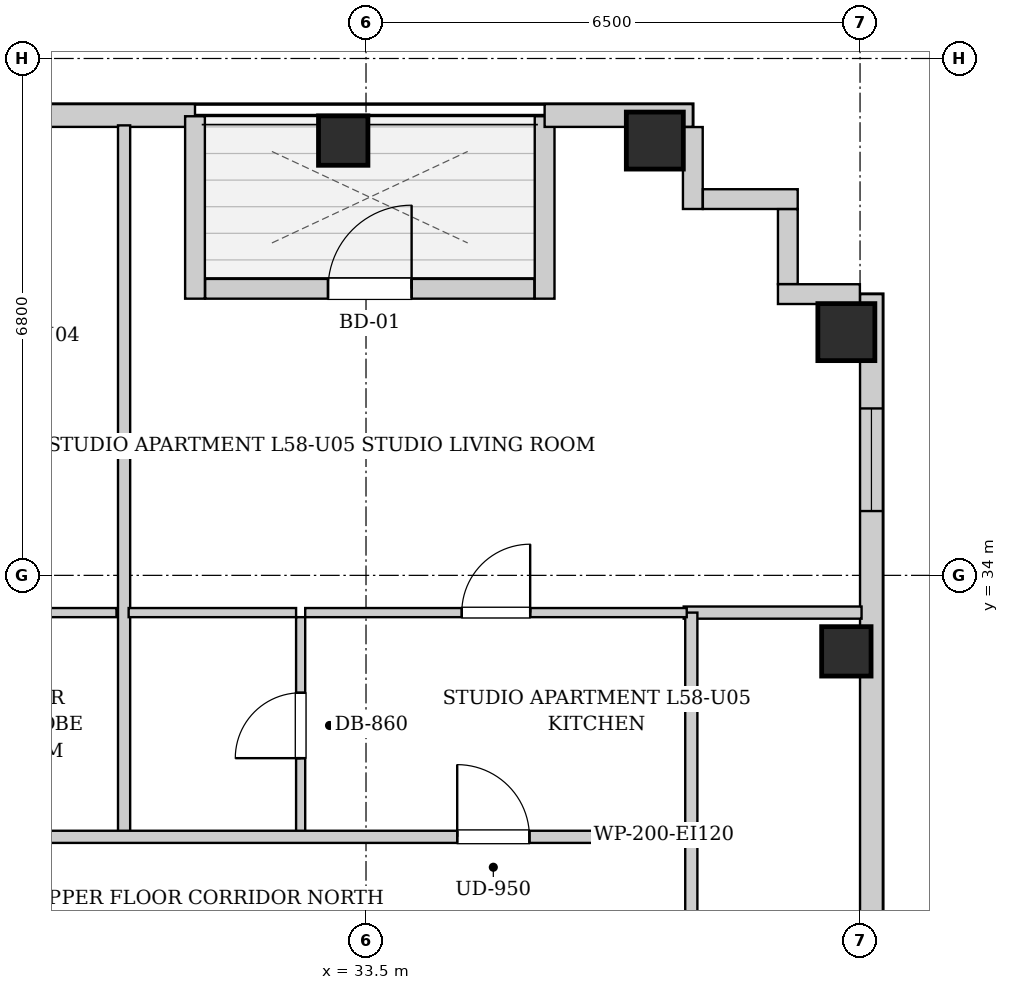
"""IFC4 building model, lengths in metres.
Left out: names, types, materials, properties, quantities, classifications, styles, units other than length and angle.
Written with IfcOpenShell. Run it as: python <this file> out.ifc"""

import sys

from ifc_helpers import new_model, si_unit, direction, frame, frame_2d, origin, origin_2d, place, context, subcontext, project, spatial, rectangle, extrude, element, fill, save


model = new_model("IFC4")
c1 = context("Model", 3, precision=1e-05, world=origin(), true_north=direction((0.0, 1.0)))
c2 = subcontext(c1, "Body", "Model", "MODEL_VIEW")
j1 = project(units=[si_unit("LENGTHUNIT", "METRE"), si_unit("PLANEANGLEUNIT", "RADIAN")], contexts=[c1])
p1 = place(None, origin())
s1 = spatial("IfcSite", under=j1, at=p1, CompositionType="ELEMENT")
p2 = place(p1, origin())
s2 = spatial("IfcBuilding", under=s1, at=p2, CompositionType="ELEMENT")
p3 = place(p2, frame((0.0, 0.0, 200.8)))
s3 = spatial("IfcBuildingStorey", under=s2, at=p3, CompositionType="ELEMENT", Elevation=200.8)
p4 = place(p3, frame((33.2, 39.72, 0.0), z_axis=(0.0, 0.0, 1.0), x_axis=(1.0, 0.0, 0.0)))
e1 = element("IfcColumn", 1, at=p4, inside=s3, PredefinedType="COLUMN", context=c2, shape_type="SweptSolid", body=[
    extrude(rectangle(XDim=0.65, YDim=0.65, at=origin_2d()), origin(), (0.0, 0.0, 1.0), 3.3),
])
p5 = place(p3, frame((37.3, 39.72, 0.0), z_axis=(0.0, 0.0, 1.0), x_axis=(1.0, 0.0, 0.0)))
e2 = element("IfcColumn", 2, at=p5, inside=s3, PredefinedType="COLUMN", context=c2, shape_type="SweptSolid", body=[
    extrude(rectangle(XDim=0.75, YDim=0.75, at=origin_2d()), origin(), (0.0, 0.0, 1.0), 3.3),
])
p6 = place(p3, frame((39.82, 33.0, 0.0), z_axis=(0.0, 0.0, 1.0), x_axis=(1.0, 0.0, 0.0)))
e3 = element("IfcColumn", 3, at=p6, inside=s3, PredefinedType="COLUMN", context=c2, shape_type="SweptSolid", body=[
    extrude(rectangle(XDim=0.65, YDim=0.65, at=origin_2d()), origin(), (0.0, 0.0, 1.0), 3.3),
])
p7 = place(p3, frame((39.82, 37.2, 0.0), z_axis=(0.0, 0.0, 1.0), x_axis=(1.0, 0.0, 0.0)))
e4 = element("IfcColumn", 4, at=p7, inside=s3, PredefinedType="COLUMN", context=c2, shape_type="SweptSolid", body=[
    extrude(rectangle(XDim=0.75, YDim=0.75, at=origin_2d()), origin(), (0.0, 0.0, 1.0), 3.3),
])
p8 = place(p3, frame((19.7, 40.05, 0.0), z_axis=(0.0, 0.0, 1.0), x_axis=(1.0, 0.0, 0.0)))
e5 = element("IfcWall", 5, at=p8, inside=s3, PredefinedType="SOLIDWALL", context=c2, shape_type="SweptSolid", body=[
    extrude(rectangle(XDim=11.55, YDim=0.3, at=frame_2d((5.775, 0.0))), origin(), (0.0, 0.0, 1.0), 3.04),
])
p9 = place(p8, frame((0.267, 0.0, 0.55)))
e6 = element("IfcOpeningElement", 6, at=p9, cuts=e5, PredefinedType="OPENING", context=c2, shape_type="SweptSolid", body=[
    extrude(rectangle(XDim=0.85, YDim=1.2, at=frame_2d((0.425, 0.6))), frame((0.0, 0.16, 0.0), z_axis=(0.0, -1.0, 0.0), x_axis=(1.0, 0.0, 0.0)), (0.0, 0.0, 1.0), 0.32),
])
p10 = place(p8, frame((1.95, 0.0, 0.55)))
e7 = element("IfcOpeningElement", 7, at=p10, cuts=e5, PredefinedType="OPENING", context=c2, shape_type="SweptSolid", body=[
    extrude(rectangle(XDim=0.85, YDim=1.2, at=frame_2d((0.425, 0.6))), frame((0.0, 0.16, 0.0), z_axis=(0.0, -1.0, 0.0), x_axis=(1.0, 0.0, 0.0)), (0.0, 0.0, 1.0), 0.32),
])
p11 = place(p8, frame((7.8, 0.0, 0.55)))
e8 = element("IfcOpeningElement", 8, at=p11, cuts=e5, PredefinedType="OPENING", context=c2, shape_type="SweptSolid", body=[
    extrude(rectangle(XDim=1.35, YDim=1.2, at=frame_2d((0.675, 0.6))), frame((0.0, 0.16, 0.0), z_axis=(0.0, -1.0, 0.0), x_axis=(1.0, 0.0, 0.0)), (0.0, 0.0, 1.0), 0.32),
])
p12 = place(p3, frame((31.25, 40.04, 0.0), z_axis=(0.0, 0.0, 1.0), x_axis=(0.0, -1.0, 0.0)))
e9 = element("IfcWall", 9, at=p12, inside=s3, PredefinedType="SOLIDWALL", context=c2, shape_type="SweptSolid", body=[
    extrude(rectangle(XDim=2.4, YDim=0.26, at=frame_2d((1.2, 0.0))), origin(), (0.0, 0.0, 1.0), 3.04),
])
p13 = place(p3, frame((31.384, 37.77, 0.0), z_axis=(0.0, 0.0, 1.0), x_axis=(1.0, 0.0, 0.0)))
e10 = element("IfcWall", 10, at=p13, inside=s3, PredefinedType="SOLIDWALL", context=c2, shape_type="SweptSolid", body=[
    extrude(rectangle(XDim=4.332, YDim=0.26, at=frame_2d((2.166, 0.0))), origin(), (0.0, 0.0, 1.0), 3.04),
])
p14 = place(p13, frame((1.616, 0.0, 0.0)))
e11 = element("IfcOpeningElement", 11, at=p14, cuts=e10, PredefinedType="OPENING", context=c2, shape_type="SweptSolid", body=[
    extrude(rectangle(XDim=1.1, YDim=2.0, at=frame_2d((0.55, 1.0))), frame((0.0, 0.14, 0.0), z_axis=(0.0, -1.0, 0.0), x_axis=(1.0, 0.0, 0.0)), (0.0, 0.0, 1.0), 0.28),
])
p15 = place(p3, frame((35.85, 37.64, 0.0), z_axis=(0.0, 0.0, 1.0), x_axis=(0.0, 1.0, 0.0)))
e12 = element("IfcWall", 12, at=p15, inside=s3, PredefinedType="SOLIDWALL", context=c2, shape_type="SweptSolid", body=[
    extrude(rectangle(XDim=2.4, YDim=0.26, at=frame_2d((1.2, 0.0))), origin(), (0.0, 0.0, 1.0), 3.04),
])
p16 = place(p3, frame((35.85, 40.05, 0.0), z_axis=(0.0, 0.0, 1.0), x_axis=(1.0, 0.0, 0.0)))
e13 = element("IfcWall", 13, at=p16, inside=s3, PredefinedType="SOLIDWALL", context=c2, shape_type="SweptSolid", body=[
    extrude(rectangle(XDim=1.95, YDim=0.3, at=frame_2d((0.975, 0.0))), origin(), (0.0, 0.0, 1.0), 3.04),
])
p17 = place(p3, frame((40.15, 37.7, 0.0), z_axis=(0.0, 0.0, 1.0), x_axis=(0.0, -1.0, 0.0)))
e14 = element("IfcWall", 14, at=p17, inside=s3, PredefinedType="SOLIDWALL", context=c2, shape_type="SweptSolid", body=[
    extrude(rectangle(XDim=31.4, YDim=0.3, at=frame_2d((15.7, 0.0))), origin(), (0.0, 0.0, 1.0), 3.04),
])
p18 = place(p17, frame((1.504, 0.0, 0.55)))
e15 = element("IfcOpeningElement", 15, at=p18, cuts=e14, PredefinedType="OPENING", context=c2, shape_type="SweptSolid", body=[
    extrude(rectangle(XDim=1.35, YDim=1.2, at=frame_2d((0.675, 0.6))), frame((0.0, 0.16, 0.0), z_axis=(0.0, -1.0, 0.0), x_axis=(1.0, 0.0, 0.0)), (0.0, 0.0, 1.0), 0.32),
])
p19 = place(p17, frame((19.683, 0.0, 0.55)))
e16 = element("IfcOpeningElement", 16, at=p19, cuts=e14, PredefinedType="OPENING", context=c2, shape_type="SweptSolid", body=[
    extrude(rectangle(XDim=1.35, YDim=1.2, at=frame_2d((0.675, 0.6))), frame((0.0, 0.16, 0.0), z_axis=(0.0, -1.0, 0.0), x_axis=(1.0, 0.0, 0.0)), (0.0, 0.0, 1.0), 0.32),
])
p20 = place(p17, frame((10.367, 0.0, 0.55)))
e17 = element("IfcOpeningElement", 17, at=p20, cuts=e14, PredefinedType="OPENING", context=c2, shape_type="SweptSolid", body=[
    extrude(rectangle(XDim=1.35, YDim=1.2, at=frame_2d((0.675, 0.6))), frame((0.0, 0.16, 0.0), z_axis=(0.0, -1.0, 0.0), x_axis=(1.0, 0.0, 0.0)), (0.0, 0.0, 1.0), 0.32),
])
p21 = place(p3, frame((37.8, 39.898, 0.0), z_axis=(0.0, 0.0, 1.0), x_axis=(0.0, -1.0, 0.0)))
e18 = element("IfcWall", 18, at=p21, inside=s3, PredefinedType="SOLIDWALL", context=c2, shape_type="SweptSolid", body=[
    extrude(rectangle(XDim=1.078, YDim=0.26, at=frame_2d((0.539, 0.0))), origin(), (0.0, 0.0, 1.0), 3.04),
])
p22 = place(p3, frame((37.932, 38.95, 0.0), z_axis=(0.0, 0.0, 1.0), x_axis=(1.0, 0.0, 0.0)))
e19 = element("IfcWall", 19, at=p22, inside=s3, PredefinedType="SOLIDWALL", context=c2, shape_type="SweptSolid", body=[
    extrude(rectangle(XDim=1.248, YDim=0.26, at=frame_2d((0.624, 0.0))), origin(), (0.0, 0.0, 1.0), 3.04),
])
p23 = place(p3, frame((39.05, 38.818, 0.0), z_axis=(0.0, 0.0, 1.0), x_axis=(0.0, -1.0, 0.0)))
e20 = element("IfcWall", 20, at=p23, inside=s3, PredefinedType="SOLIDWALL", context=c2, shape_type="SweptSolid", body=[
    extrude(rectangle(XDim=0.986, YDim=0.26, at=frame_2d((0.493, 0.0))), origin(), (0.0, 0.0, 1.0), 3.04),
])
p24 = place(p3, frame((38.92, 37.7, 0.0), z_axis=(0.0, 0.0, 1.0), x_axis=(1.0, 0.0, 0.0)))
e21 = element("IfcWall", 21, at=p24, inside=s3, PredefinedType="SOLIDWALL", context=c2, shape_type="SweptSolid", body=[
    extrude(rectangle(XDim=1.078, YDim=0.26, at=frame_2d((0.539, 0.0))), origin(), (0.0, 0.0, 1.0), 3.04),
])
p25 = place(p3, frame((37.78, 28.98, 0.0), z_axis=(0.0, 0.0, 1.0), x_axis=(0.0, 1.0, 0.0)))
e22 = element("IfcWall", 22, at=p25, inside=s3, PredefinedType="PARTITIONING", context=c2, shape_type="SweptSolid", body=[
    extrude(rectangle(XDim=1.58, YDim=0.16, at=frame_2d((0.79, 0.0))), origin(), (0.0, 0.0, 1.0), 3.04),
])
p26 = place(p3, frame((26.54, 33.51, 0.0), z_axis=(0.0, 0.0, 1.0), x_axis=(1.0, 0.0, 0.0)))
e23 = element("IfcWall", 23, at=p26, inside=s3, PredefinedType="PARTITIONING", context=c2, shape_type="SweptSolid", body=[
    extrude(rectangle(XDim=3.677, YDim=0.12, at=frame_2d((1.838, 0.0))), origin(), (0.0, 0.0, 1.0), 3.04),
])
p27 = place(p26, frame((1.388, 0.0, 0.0)))
e24 = element("IfcOpeningElement", 24, at=p27, cuts=e23, PredefinedType="OPENING", context=c2, shape_type="SweptSolid", body=[
    extrude(rectangle(XDim=0.9, YDim=2.05, at=frame_2d((0.45, 1.025))), frame((0.0, 0.07, 0.0), z_axis=(0.0, -1.0, 0.0), x_axis=(1.0, 0.0, 0.0)), (0.0, 0.0, 1.0), 0.14),
])
p28 = place(p3, frame((37.68, 33.51, 0.0), z_axis=(0.0, 0.0, 1.0), x_axis=(1.0, 0.0, 0.0)))
e25 = element("IfcWall", 25, at=p28, inside=s3, PredefinedType="PARTITIONING", context=c2, shape_type="SweptSolid", body=[
    extrude(rectangle(XDim=2.34, YDim=0.16, at=frame_2d((1.17, 0.0))), origin(), (0.0, 0.0, 1.0), 3.04),
])
p29 = place(p3, frame((37.78, 30.6, 0.0), z_axis=(0.0, 0.0, 1.0), x_axis=(0.0, 1.0, 0.0)))
e26 = element("IfcWall", 26, at=p29, inside=s3, PredefinedType="PARTITIONING", context=c2, shape_type="SweptSolid", body=[
    extrude(rectangle(XDim=2.91, YDim=0.16, at=frame_2d((1.455, 0.0))), origin(), (0.0, 0.0, 1.0), 3.04),
])
p30 = place(p3, frame((30.317, 30.6, 0.0), z_axis=(0.0, 0.0, 1.0), x_axis=(0.0, 1.0, 0.0)))
e27 = element("IfcWall", 27, at=p30, inside=s3, PredefinedType="PARTITIONING", context=c2, shape_type="SweptSolid", body=[
    extrude(rectangle(XDim=9.32, YDim=0.16, at=frame_2d((4.66, 0.0))), origin(), (0.0, 0.0, 1.0), 3.04),
])
p31 = place(p3, frame((32.64, 30.6, 0.0), z_axis=(0.0, 0.0, 1.0), x_axis=(0.0, 1.0, 0.0)))
e28 = element("IfcWall", 28, at=p31, inside=s3, PredefinedType="PARTITIONING", context=c2, shape_type="SweptSolid", body=[
    extrude(rectangle(XDim=2.85, YDim=0.12, at=frame_2d((1.425, 0.0))), origin(), (0.0, 0.0, 1.0), 3.04),
])
p32 = place(p31, frame((0.995, 0.0, 0.0)))
e29 = element("IfcOpeningElement", 29, at=p32, cuts=e28, PredefinedType="OPENING", context=c2, shape_type="SweptSolid", body=[
    extrude(rectangle(XDim=0.86, YDim=2.05, at=frame_2d((0.43, 1.025))), frame((0.0, 0.07, 0.0), z_axis=(0.0, -1.0, 0.0), x_axis=(1.0, 0.0, 0.0)), (0.0, 0.0, 1.0), 0.14),
])
p33 = place(p3, frame((30.377, 33.51, 0.0), z_axis=(0.0, 0.0, 1.0), x_axis=(1.0, 0.0, 0.0)))
e30 = element("IfcWall", 30, at=p33, inside=s3, PredefinedType="PARTITIONING", context=c2, shape_type="SweptSolid", body=[
    extrude(rectangle(XDim=2.203, YDim=0.12, at=frame_2d((1.102, 0.0))), origin(), (0.0, 0.0, 1.0), 3.04),
])
p34 = place(p3, frame((32.7, 33.51, 0.0), z_axis=(0.0, 0.0, 1.0), x_axis=(1.0, 0.0, 0.0)))
e31 = element("IfcWall", 31, at=p34, inside=s3, PredefinedType="PARTITIONING", context=c2, shape_type="SweptSolid", body=[
    extrude(rectangle(XDim=5.02, YDim=0.12, at=frame_2d((2.51, 0.0))), origin(), (0.0, 0.0, 1.0), 3.04),
])
p35 = place(p34, frame((2.06, 0.0, 0.0)))
e32 = element("IfcOpeningElement", 32, at=p35, cuts=e31, PredefinedType="OPENING", context=c2, shape_type="SweptSolid", body=[
    extrude(rectangle(XDim=0.9, YDim=2.05, at=frame_2d((0.45, 1.025))), frame((0.0, 0.07, 0.0), z_axis=(0.0, -1.0, 0.0), x_axis=(1.0, 0.0, 0.0)), (0.0, 0.0, 1.0), 0.14),
])
p36 = place(p3, frame((13.15, 30.56, 0.0), z_axis=(0.0, 0.0, 1.0), x_axis=(1.0, 0.0, 0.0)))
e33 = element("IfcWall", 33, at=p36, inside=s3, PredefinedType="PARTITIONING", context=c2, shape_type="SweptSolid", body=[
    extrude(rectangle(XDim=24.6, YDim=0.16, at=frame_2d((12.3, 0.0))), origin(), (0.0, 0.0, 1.0), 3.04),
])
p37 = place(p36, frame((3.115, 0.0, 0.0)))
e34 = element("IfcOpeningElement", 34, at=p37, cuts=e33, PredefinedType="OPENING", context=c2, shape_type="SweptSolid", body=[
    extrude(rectangle(XDim=0.95, YDim=2.1, at=frame_2d((0.475, 1.05))), frame((0.0, 0.09, 0.0), z_axis=(0.0, -1.0, 0.0), x_axis=(1.0, 0.0, 0.0)), (0.0, 0.0, 1.0), 0.18),
])
p38 = place(p36, frame((21.55, 0.0, 0.0)))
e35 = element("IfcOpeningElement", 35, at=p38, cuts=e33, PredefinedType="OPENING", context=c2, shape_type="SweptSolid", body=[
    extrude(rectangle(XDim=0.95, YDim=2.1, at=frame_2d((0.475, 1.05))), frame((0.0, 0.09, 0.0), z_axis=(0.0, -1.0, 0.0), x_axis=(1.0, 0.0, 0.0)), (0.0, 0.0, 1.0), 0.18),
])
p39 = place(p32, origin())
e36 = element("IfcDoor", 36, at=p39, inside=s3, OperationType="SINGLE_SWING_LEFT", PredefinedType="DOOR", context=c2, shape_type="SweptSolid", body=[
    extrude(rectangle(XDim=0.86, YDim=2.05, at=frame_2d((0.43, 1.025))), frame((0.0, 0.025, 0.0), z_axis=(0.0, -1.0, 0.0), x_axis=(1.0, 0.0, 0.0)), (0.0, 0.0, 1.0), 0.05),
])
fill(e29, e36)
p40 = place(p35, origin())
e37 = element("IfcDoor", 37, at=p40, inside=s3, OperationType="SINGLE_SWING_RIGHT", PredefinedType="DOOR", context=c2, shape_type="SweptSolid", body=[
    extrude(rectangle(XDim=0.9, YDim=2.05, at=frame_2d((0.45, 1.025))), frame((0.0, 0.025, 0.0), z_axis=(0.0, -1.0, 0.0), x_axis=(1.0, 0.0, 0.0)), (0.0, 0.0, 1.0), 0.05),
])
fill(e32, e37)
p41 = place(p38, origin())
e38 = element("IfcDoor", 38, at=p41, inside=s3, OperationType="SINGLE_SWING_LEFT", PredefinedType="DOOR", context=c2, shape_type="SweptSolid", body=[
    extrude(rectangle(XDim=0.95, YDim=2.1, at=frame_2d((0.475, 1.05))), frame((0.0, 0.025, 0.0), z_axis=(0.0, -1.0, 0.0), x_axis=(1.0, 0.0, 0.0)), (0.0, 0.0, 1.0), 0.05),
])
fill(e35, e38)
p42 = place(p14, origin())
e39 = element("IfcDoor", 39, at=p42, inside=s3, OperationType="SINGLE_SWING_RIGHT", PredefinedType="DOOR", context=c2, shape_type="SweptSolid", body=[
    extrude(rectangle(XDim=1.1, YDim=2.0, at=frame_2d((0.55, 1.0))), frame((0.0, 0.025, 0.0), z_axis=(0.0, -1.0, 0.0), x_axis=(1.0, 0.0, 0.0)), (0.0, 0.0, 1.0), 0.05),
])
fill(e11, e39)
p43 = place(p18, origin())
e40 = element("IfcWindow", 40, at=p43, inside=s3, PartitioningType="SINGLE_PANEL", PredefinedType="WINDOW", context=c2, shape_type="SweptSolid", body=[
    extrude(rectangle(XDim=1.35, YDim=1.2, at=frame_2d((0.675, 0.6))), frame((0.0, 0.03, 0.0), z_axis=(0.0, -1.0, 0.0), x_axis=(1.0, 0.0, 0.0)), (0.0, 0.0, 1.0), 0.06),
])
fill(e15, e40)
save(model, sys.argv[1])
